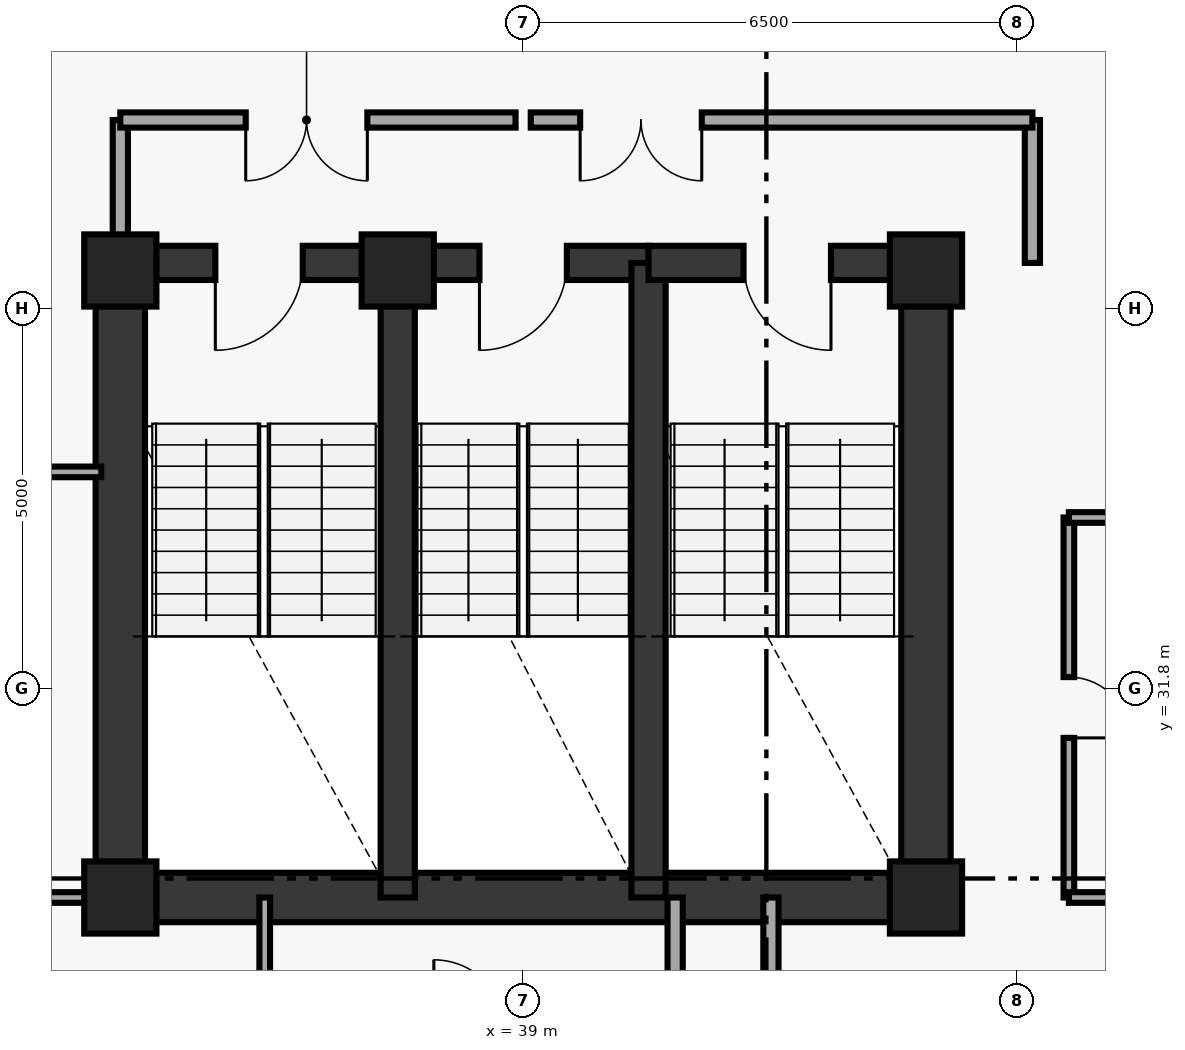
"""IFC4 building model, lengths in metres.
Left out: names, types, materials, properties, quantities, classifications, styles, units other than length and angle.
Written with IfcOpenShell. Run it as: python <this file> out.ifc"""

import sys

from ifc_helpers import new_model, si_unit, direction, frame, frame_2d, origin, origin_2d, place, context, subcontext, project, spatial, rectangle, extrude, element, fill, save


model = new_model("IFC4")
c1 = context("Model", 3, precision=1e-05, world=origin(), true_north=direction((0.0, 1.0)))
c2 = subcontext(c1, "Body", "Model", "MODEL_VIEW")
j1 = project(units=[si_unit("LENGTHUNIT", "METRE"), si_unit("PLANEANGLEUNIT", "RADIAN")], contexts=[c1])
p1 = place(None, origin())
s1 = spatial("IfcSite", under=j1, at=p1, CompositionType="ELEMENT")
p2 = place(p1, origin())
s2 = spatial("IfcBuilding", under=s1, at=p2, CompositionType="ELEMENT")
p3 = place(p2, frame((0.0, 0.0, 192.25)))
s3 = spatial("IfcBuildingStorey", under=s2, at=p3, CompositionType="ELEMENT", Elevation=192.25)
for number, where, z_axis, x_axis in (
    (1, (44.3, 29.05, 0.0), (0.0, 0.0, 1.0), (1.0, 0.0, 0.0)),
    (2, (44.3, 37.3, 0.0), (0.0, 0.0, 1.0), (1.0, 0.0, 0.0)),
    (3, (37.35, 37.3, 0.0), (0.0, 0.0, 1.0), (1.0, 0.0, 0.0)),
    (4, (33.7, 37.3, 0.0), (0.0, 0.0, 1.0), (1.0, 0.0, 0.0)),
    (5, (33.7, 29.05, 0.0), (0.0, 0.0, 1.0), (1.0, 0.0, 0.0)),
):
    element("IfcColumn", number, at=place(p3, frame(where, z_axis=z_axis, x_axis=x_axis)), inside=s3, PredefinedType="PILASTER", context=c2, shape_type="SweptSolid", body=[
        extrude(rectangle(XDim=0.95, YDim=0.95, at=origin_2d()), origin(), (0.0, 0.0, 1.0), 3.35),
    ])
for number, where, z_axis, x_axis in (
    (6, (33.7, 29.05, 0.0), (0.0, 0.0, 1.0), (0.0, 1.0, 0.0)),
    (7, (44.3, 29.05, 0.0), (0.0, 0.0, 1.0), (0.0, 1.0, 0.0)),
):
    element("IfcWall", number, at=place(p3, frame(where, z_axis=z_axis, x_axis=x_axis)), inside=s3, PredefinedType="SHEAR", context=c2, shape_type="SweptSolid", body=[
        extrude(rectangle(XDim=8.35, YDim=0.65, at=frame_2d((4.175, 0.0))), origin(), (0.0, 0.0, 1.0), 3.35),
    ])
p4 = place(p3, frame((33.7, 29.05, 0.0), z_axis=(0.0, 0.0, 1.0), x_axis=(1.0, 0.0, 0.0)))
e8 = element("IfcWall", 8, at=p4, inside=s3, PredefinedType="SHEAR", context=c2, shape_type="SweptSolid", body=[
    extrude(rectangle(XDim=10.6, YDim=0.65, at=frame_2d((5.3, 0.0))), origin(), (0.0, 0.0, 1.0), 3.35),
])
p5 = place(p3, frame((37.35, 37.4, 0.0), z_axis=(0.0, 0.0, 1.0), x_axis=(-1.0, 0.0, 0.0)))
e9 = element("IfcWall", 9, at=p5, inside=s3, PredefinedType="SHEAR", context=c2, shape_type="SweptSolid", body=[
    extrude(rectangle(XDim=3.65, YDim=0.45, at=frame_2d((1.825, 0.0))), origin(), (0.0, 0.0, 1.0), 3.35),
])
p6 = place(p5, frame((1.25, 0.0, 0.0)))
e10 = element("IfcOpeningElement", 10, at=p6, cuts=e9, PredefinedType="OPENING", context=c2, shape_type="SweptSolid", body=[
    extrude(rectangle(XDim=1.15, YDim=2.15, at=frame_2d((0.575, 1.075))), frame((0.0, 0.235, 0.0), z_axis=(0.0, -1.0, 0.0), x_axis=(1.0, 0.0, 0.0)), (0.0, 0.0, 1.0), 0.47),
])
p7 = place(p3, frame((37.35, 29.05, 0.0), z_axis=(0.0, 0.0, 1.0), x_axis=(0.0, 1.0, 0.0)))
e11 = element("IfcWall", 11, at=p7, inside=s3, PredefinedType="SHEAR", context=c2, shape_type="SweptSolid", body=[
    extrude(rectangle(XDim=8.35, YDim=0.45, at=frame_2d((4.175, 0.0))), origin(), (0.0, 0.0, 1.0), 3.35),
])
p8 = place(p3, frame((40.65, 37.4, 0.0), z_axis=(0.0, 0.0, 1.0), x_axis=(-1.0, 0.0, 0.0)))
e12 = element("IfcWall", 12, at=p8, inside=s3, PredefinedType="SHEAR", context=c2, shape_type="SweptSolid", body=[
    extrude(rectangle(XDim=3.3, YDim=0.45, at=frame_2d((1.65, 0.0))), origin(), (0.0, 0.0, 1.0), 3.35),
])
p9 = place(p8, frame((1.075, 0.0, 0.0)))
e13 = element("IfcOpeningElement", 13, at=p9, cuts=e12, PredefinedType="OPENING", context=c2, shape_type="SweptSolid", body=[
    extrude(rectangle(XDim=1.15, YDim=2.15, at=frame_2d((0.575, 1.075))), frame((0.0, 0.235, 0.0), z_axis=(0.0, -1.0, 0.0), x_axis=(1.0, 0.0, 0.0)), (0.0, 0.0, 1.0), 0.47),
])
p10 = place(p3, frame((40.65, 29.05, 0.0), z_axis=(0.0, 0.0, 1.0), x_axis=(0.0, 1.0, 0.0)))
e14 = element("IfcWall", 14, at=p10, inside=s3, PredefinedType="SHEAR", context=c2, shape_type="SweptSolid", body=[
    extrude(rectangle(XDim=8.35, YDim=0.45, at=frame_2d((4.175, 0.0))), origin(), (0.0, 0.0, 1.0), 3.35),
])
p11 = place(p3, frame((44.3, 37.4, 0.0), z_axis=(0.0, 0.0, 1.0), x_axis=(-1.0, 0.0, 0.0)))
e15 = element("IfcWall", 15, at=p11, inside=s3, PredefinedType="SHEAR", context=c2, shape_type="SweptSolid", body=[
    extrude(rectangle(XDim=3.65, YDim=0.45, at=frame_2d((1.825, 0.0))), origin(), (0.0, 0.0, 1.0), 3.35),
])
p12 = place(p11, frame((1.25, 0.0, 0.0)))
e16 = element("IfcOpeningElement", 16, at=p12, cuts=e15, PredefinedType="OPENING", context=c2, shape_type="SweptSolid", body=[
    extrude(rectangle(XDim=1.15, YDim=2.15, at=frame_2d((0.575, 1.075))), frame((0.0, 0.235, 0.0), z_axis=(0.0, -1.0, 0.0), x_axis=(1.0, 0.0, 0.0)), (0.0, 0.0, 1.0), 0.47),
])
for number, where, z_axis, x_axis in (
    (17, (33.7, 37.4, 0.0), (0.0, 0.0, 1.0), (0.0, 1.0, 0.0)),
    (18, (45.7, 37.4, 0.0), (0.0, 0.0, 1.0), (0.0, 1.0, 0.0)),
):
    element("IfcWall", number, at=place(p3, frame(where, z_axis=z_axis, x_axis=x_axis)), inside=s3, PredefinedType="SOLIDWALL", context=c2, shape_type="SweptSolid", body=[
        extrude(rectangle(XDim=1.88, YDim=0.2, at=frame_2d((0.94, 0.0))), origin(), (0.0, 0.0, 1.0), 3.35),
    ])
p13 = place(p3, frame((38.9, 39.28, 0.0), z_axis=(0.0, 0.0, 1.0), x_axis=(-1.0, 0.0, 0.0)))
e19 = element("IfcWall", 19, at=p13, inside=s3, PredefinedType="SOLIDWALL", context=c2, shape_type="SweptSolid", body=[
    extrude(rectangle(XDim=5.2, YDim=0.2, at=frame_2d((2.6, 0.0))), origin(), (0.0, 0.0, 1.0), 3.35),
])
p14 = place(p13, frame((1.95, 0.0, 0.0)))
e20 = element("IfcOpeningElement", 20, at=p14, cuts=e19, PredefinedType="OPENING", context=c2, shape_type="SweptSolid", body=[
    extrude(rectangle(XDim=1.6, YDim=2.2, at=frame_2d((0.8, 1.1))), frame((0.0, 0.11, 0.0), z_axis=(0.0, -1.0, 0.0), x_axis=(1.0, 0.0, 0.0)), (0.0, 0.0, 1.0), 0.22),
])
p15 = place(p3, frame((45.7, 39.28, 0.0), z_axis=(0.0, 0.0, 1.0), x_axis=(-1.0, 0.0, 0.0)))
e21 = element("IfcWall", 21, at=p15, inside=s3, PredefinedType="SOLIDWALL", context=c2, shape_type="SweptSolid", body=[
    extrude(rectangle(XDim=6.6, YDim=0.2, at=frame_2d((3.3, 0.0))), origin(), (0.0, 0.0, 1.0), 3.35),
])
p16 = place(p15, frame((4.35, 0.0, 0.0)))
e22 = element("IfcOpeningElement", 22, at=p16, cuts=e21, PredefinedType="OPENING", context=c2, shape_type="SweptSolid", body=[
    extrude(rectangle(XDim=1.6, YDim=2.2, at=frame_2d((0.8, 1.1))), frame((0.0, 0.11, 0.0), z_axis=(0.0, -1.0, 0.0), x_axis=(1.0, 0.0, 0.0)), (0.0, 0.0, 1.0), 0.22),
])
p17 = place(p3, frame((35.6, 27.28, 0.0), z_axis=(0.0, 0.0, 1.0), x_axis=(0.0, 1.0, 0.0)))
e23 = element("IfcWall", 23, at=p17, inside=s3, PredefinedType="PARTITIONING", context=c2, shape_type="SweptSolid", body=[
    extrude(rectangle(XDim=1.77, YDim=0.14, at=frame_2d((0.885, 0.0))), origin(), (0.0, 0.0, 1.0), 3.35),
])
for number, where, z_axis, x_axis in (
    (24, (41.0, 27.28, 0.0), (0.0, 0.0, 1.0), (0.0, 1.0, 0.0)),
    (25, (42.26, 27.28, 0.0), (0.0, 0.0, 1.0), (0.0, 1.0, 0.0)),
):
    element("IfcWall", number, at=place(p3, frame(where, z_axis=z_axis, x_axis=x_axis)), inside=s3, PredefinedType="SOLIDWALL", context=c2, shape_type="SweptSolid", body=[
        extrude(rectangle(XDim=1.77, YDim=0.2, at=frame_2d((0.885, 0.0))), origin(), (0.0, 0.0, 1.0), 3.35),
    ])
p18 = place(p3, frame((30.85, 29.05, 0.0), z_axis=(0.0, 0.0, 1.0), x_axis=(1.0, 0.0, 0.0)))
e26 = element("IfcWall", 26, at=p18, inside=s3, PredefinedType="PARTITIONING", context=c2, shape_type="SweptSolid", body=[
    extrude(rectangle(XDim=2.6, YDim=0.14, at=frame_2d((1.3, 0.0))), origin(), (0.0, 0.0, 1.0), 2.31),
])
p19 = place(p18, frame((0.9, 0.0, 0.0)))
e27 = element("IfcOpeningElement", 27, at=p19, cuts=e26, PredefinedType="OPENING", context=c2, shape_type="SweptSolid", body=[
    extrude(rectangle(XDim=0.8, YDim=2.05, at=frame_2d((0.4, 1.025))), frame((0.0, 0.08, 0.0), z_axis=(0.0, -1.0, 0.0), x_axis=(1.0, 0.0, 0.0)), (0.0, 0.0, 1.0), 0.16),
])
p20 = place(p3, frame((30.85, 34.65, 0.0), z_axis=(0.0, 0.0, 1.0), x_axis=(1.0, 0.0, 0.0)))
e28 = element("IfcWall", 28, at=p20, inside=s3, PredefinedType="PARTITIONING", context=c2, shape_type="SweptSolid", body=[
    extrude(rectangle(XDim=2.6, YDim=0.14, at=frame_2d((1.3, 0.0))), origin(), (0.0, 0.0, 1.0), 3.35),
])
p21 = place(p3, frame((46.18, 34.05, 0.0), z_axis=(0.0, 0.0, 1.0), x_axis=(0.0, -1.0, 0.0)))
e29 = element("IfcWall", 29, at=p21, inside=s3, PredefinedType="PARTITIONING", context=c2, shape_type="SweptSolid", body=[
    extrude(rectangle(XDim=5.0, YDim=0.14, at=frame_2d((2.5, 0.0))), origin(), (0.0, 0.0, 1.0), 3.35),
])
p22 = place(p21, frame((2.1, 0.0, 0.0)))
e30 = element("IfcOpeningElement", 30, at=p22, cuts=e29, PredefinedType="OPENING", context=c2, shape_type="SweptSolid", body=[
    extrude(rectangle(XDim=0.8, YDim=2.05, at=frame_2d((0.4, 1.025))), frame((0.0, 0.08, 0.0), z_axis=(0.0, -1.0, 0.0), x_axis=(1.0, 0.0, 0.0)), (0.0, 0.0, 1.0), 0.16),
])
for number, where, z_axis, x_axis in (
    (31, (46.18, 29.05, 0.0), (0.0, 0.0, 1.0), (1.0, 0.0, 0.0)),
    (32, (46.18, 34.05, 0.0), (0.0, 0.0, 1.0), (1.0, 0.0, 0.0)),
):
    element("IfcWall", number, at=place(p3, frame(where, z_axis=z_axis, x_axis=x_axis)), inside=s3, PredefinedType="PARTITIONING", context=c2, shape_type="SweptSolid", body=[
        extrude(rectangle(XDim=1.64, YDim=0.14, at=frame_2d((0.82, 0.0))), origin(), (0.0, 0.0, 1.0), 3.35),
    ])
p23 = place(p6, origin())
e33 = element("IfcDoor", 33, at=p23, inside=s3, OperationType="SINGLE_SWING_RIGHT", PredefinedType="DOOR", context=c2, shape_type="SweptSolid", body=[
    extrude(rectangle(XDim=1.15, YDim=2.15, at=frame_2d((0.575, 1.075))), frame((0.0, 0.025, 0.0), z_axis=(0.0, -1.0, 0.0), x_axis=(1.0, 0.0, 0.0)), (0.0, 0.0, 1.0), 0.05),
])
fill(e10, e33)
p24 = place(p9, origin())
e34 = element("IfcDoor", 34, at=p24, inside=s3, OperationType="SINGLE_SWING_RIGHT", PredefinedType="DOOR", context=c2, shape_type="SweptSolid", body=[
    extrude(rectangle(XDim=1.15, YDim=2.15, at=frame_2d((0.575, 1.075))), frame((0.0, 0.025, 0.0), z_axis=(0.0, -1.0, 0.0), x_axis=(1.0, 0.0, 0.0)), (0.0, 0.0, 1.0), 0.05),
])
fill(e13, e34)
p25 = place(p12, origin())
e35 = element("IfcDoor", 35, at=p25, inside=s3, OperationType="SINGLE_SWING_LEFT", PredefinedType="DOOR", context=c2, shape_type="SweptSolid", body=[
    extrude(rectangle(XDim=1.15, YDim=2.15, at=frame_2d((0.575, 1.075))), frame((0.0, 0.025, 0.0), z_axis=(0.0, -1.0, 0.0), x_axis=(1.0, 0.0, 0.0)), (0.0, 0.0, 1.0), 0.05),
])
fill(e16, e35)
p26 = place(p14, origin())
e36 = element("IfcDoor", 36, at=p26, inside=s3, OperationType="DOUBLE_DOOR_SINGLE_SWING", PredefinedType="DOOR", context=c2, shape_type="SweptSolid", body=[
    extrude(rectangle(XDim=1.6, YDim=2.2, at=frame_2d((0.8, 1.1))), frame((0.0, 0.025, 0.0), z_axis=(0.0, -1.0, 0.0), x_axis=(1.0, 0.0, 0.0)), (0.0, 0.0, 1.0), 0.05),
])
fill(e20, e36)
p27 = place(p16, origin())
e37 = element("IfcDoor", 37, at=p27, inside=s3, OperationType="DOUBLE_DOOR_SINGLE_SWING", PredefinedType="DOOR", context=c2, shape_type="SweptSolid", body=[
    extrude(rectangle(XDim=1.6, YDim=2.2, at=frame_2d((0.8, 1.1))), frame((0.0, 0.025, 0.0), z_axis=(0.0, -1.0, 0.0), x_axis=(1.0, 0.0, 0.0)), (0.0, 0.0, 1.0), 0.05),
])
fill(e22, e37)
p28 = place(p22, origin())
e38 = element("IfcDoor", 38, at=p28, inside=s3, OperationType="SINGLE_SWING_RIGHT", PredefinedType="DOOR", context=c2, shape_type="SweptSolid", body=[
    extrude(rectangle(XDim=0.8, YDim=2.05, at=frame_2d((0.4, 1.025))), frame((0.0, 0.025, 0.0), z_axis=(0.0, -1.0, 0.0), x_axis=(1.0, 0.0, 0.0)), (0.0, 0.0, 1.0), 0.05),
])
fill(e30, e38)
save(model, sys.argv[1])
